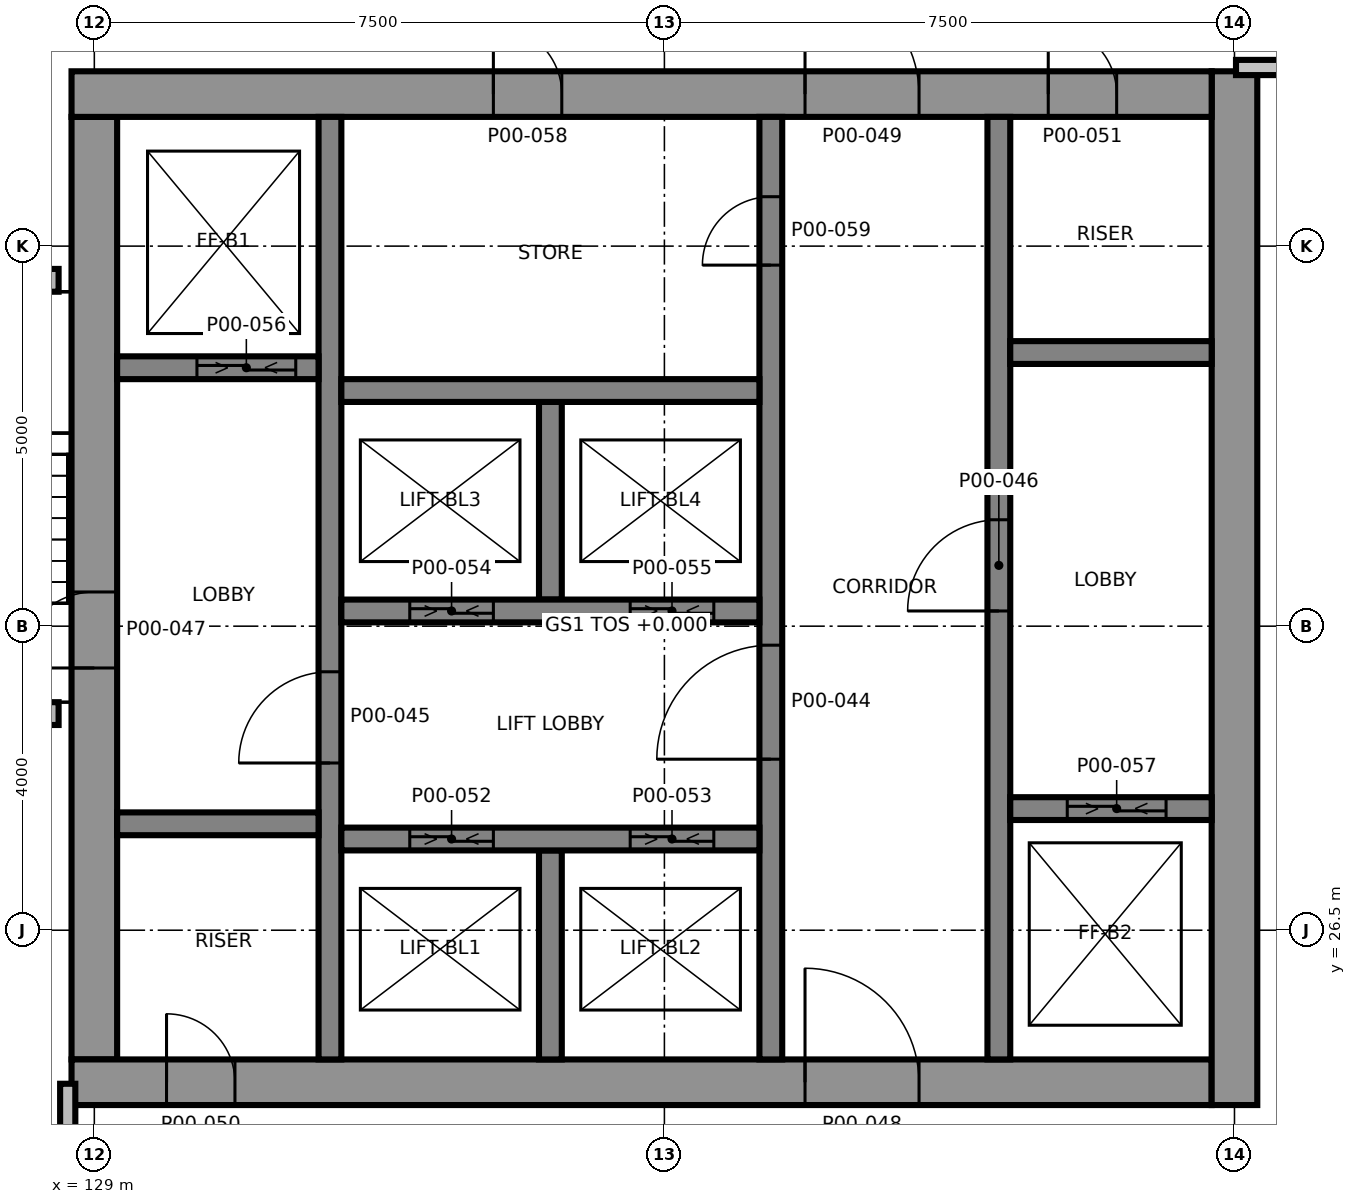
"""IFC4 building model, lengths in metres.
Left out: names, types, materials, properties, quantities, classifications, styles, units other than length and angle.
Written with IfcOpenShell. Run it as: python <this file> out.ifc"""

import sys

from ifc_helpers import new_model, si_unit, direction, frame, frame_2d, origin, place, context, subcontext, project, spatial, rectangle, extrude, element, fill, save


model = new_model("IFC4")
c1 = context("Model", 3, precision=1e-05, world=origin(), true_north=direction((0.0, 1.0)))
c2 = subcontext(c1, "Body", "Model", "MODEL_VIEW")
j1 = project(units=[si_unit("LENGTHUNIT", "METRE"), si_unit("PLANEANGLEUNIT", "RADIAN")], contexts=[c1])
p1 = place(None, origin())
s1 = spatial("IfcSite", under=j1, at=p1, CompositionType="ELEMENT")
p2 = place(p1, origin())
s2 = spatial("IfcBuilding", under=s1, at=p2, CompositionType="ELEMENT")
p3 = place(p2, origin())
s3 = spatial("IfcBuildingStorey", under=s2, at=p3, CompositionType="ELEMENT", Elevation=0.0)
p4 = place(p3, frame((129.0, 24.8, 0.0), z_axis=(0.0, 0.0, 1.0), x_axis=(0.0, 1.0, 0.0)))
e1 = element("IfcWall", 1, at=p4, inside=s3, PredefinedType="SHEAR", context=c2, shape_type="SweptSolid", body=[
    extrude(rectangle(XDim=12.4, YDim=0.6, at=frame_2d((6.2, 0.0))), origin(), (0.0, 0.0, 1.0), 8.0),
])
p5 = place(p4, frame((5.15, 0.0, 0.0)))
e2 = element("IfcOpeningElement", 2, at=p5, cuts=e1, PredefinedType="OPENING", context=c2, shape_type="SweptSolid", body=[
    extrude(rectangle(XDim=1.0, YDim=2.1, at=frame_2d((0.5, 1.05))), frame((0.0, 0.31, 0.0), z_axis=(0.0, -1.0, 0.0), x_axis=(1.0, 0.0, 0.0)), (0.0, 0.0, 1.0), 0.62),
])
p6 = place(p3, frame((128.7, 24.5, 0.0), z_axis=(0.0, 0.0, 1.0), x_axis=(1.0, 0.0, 0.0)))
e3 = element("IfcWall", 3, at=p6, inside=s3, PredefinedType="SHEAR", context=c2, shape_type="SweptSolid", body=[
    extrude(rectangle(XDim=15.0, YDim=0.6, at=frame_2d((7.5, 0.0))), origin(), (0.0, 0.0, 1.0), 8.0),
])
p7 = place(p6, frame((9.65, 0.0, 0.0)))
e4 = element("IfcOpeningElement", 4, at=p7, cuts=e3, PredefinedType="OPENING", context=c2, shape_type="SweptSolid", body=[
    extrude(rectangle(XDim=1.5, YDim=2.1, at=frame_2d((0.75, 1.05))), frame((0.0, 0.31, 0.0), z_axis=(0.0, -1.0, 0.0), x_axis=(1.0, 0.0, 0.0)), (0.0, 0.0, 1.0), 0.62),
])
p8 = place(p6, frame((1.25, 0.0, 0.0)))
e5 = element("IfcOpeningElement", 5, at=p8, cuts=e3, PredefinedType="OPENING", context=c2, shape_type="SweptSolid", body=[
    extrude(rectangle(XDim=0.9, YDim=2.1, at=frame_2d((0.45, 1.05))), frame((0.0, 0.31, 0.0), z_axis=(0.0, -1.0, 0.0), x_axis=(1.0, 0.0, 0.0)), (0.0, 0.0, 1.0), 0.62),
])
p9 = place(p3, frame((144.0, 24.2, 0.0), z_axis=(0.0, 0.0, 1.0), x_axis=(0.0, 1.0, 0.0)))
e6 = element("IfcWall", 6, at=p9, inside=s3, PredefinedType="SHEAR", context=c2, shape_type="SweptSolid", body=[
    extrude(rectangle(XDim=13.6, YDim=0.6, at=frame_2d((6.8, 0.0))), origin(), (0.0, 0.0, 1.0), 8.0),
])
p10 = place(p3, frame((128.7, 37.5, 0.0), z_axis=(0.0, 0.0, 1.0), x_axis=(1.0, 0.0, 0.0)))
e7 = element("IfcWall", 7, at=p10, inside=s3, PredefinedType="SHEAR", context=c2, shape_type="SweptSolid", body=[
    extrude(rectangle(XDim=15.0, YDim=0.6, at=frame_2d((7.5, 0.0))), origin(), (0.0, 0.0, 1.0), 8.0),
])
p11 = place(p10, frame((9.65, 0.0, 0.0)))
e8 = element("IfcOpeningElement", 8, at=p11, cuts=e7, PredefinedType="OPENING", context=c2, shape_type="SweptSolid", body=[
    extrude(rectangle(XDim=1.5, YDim=2.1, at=frame_2d((0.75, 1.05))), frame((0.0, 0.31, 0.0), z_axis=(0.0, -1.0, 0.0), x_axis=(1.0, 0.0, 0.0)), (0.0, 0.0, 1.0), 0.62),
])
p12 = place(p10, frame((12.85, 0.0, 0.0)))
e9 = element("IfcOpeningElement", 9, at=p12, cuts=e7, PredefinedType="OPENING", context=c2, shape_type="SweptSolid", body=[
    extrude(rectangle(XDim=0.9, YDim=2.1, at=frame_2d((0.45, 1.05))), frame((0.0, 0.31, 0.0), z_axis=(0.0, -1.0, 0.0), x_axis=(1.0, 0.0, 0.0)), (0.0, 0.0, 1.0), 0.62),
])
p13 = place(p10, frame((5.55, 0.0, 0.0)))
e10 = element("IfcOpeningElement", 10, at=p13, cuts=e7, PredefinedType="OPENING", context=c2, shape_type="SweptSolid", body=[
    extrude(rectangle(XDim=0.9, YDim=2.1, at=frame_2d((0.45, 1.05))), frame((0.0, 0.31, 0.0), z_axis=(0.0, -1.0, 0.0), x_axis=(1.0, 0.0, 0.0)), (0.0, 0.0, 1.0), 0.62),
])
p14 = place(p3, frame((132.1, 24.8, 0.0), z_axis=(0.0, 0.0, 1.0), x_axis=(0.0, 1.0, 0.0)))
e11 = element("IfcWall", 11, at=p14, inside=s3, PredefinedType="SHEAR", context=c2, shape_type="SweptSolid", body=[
    extrude(rectangle(XDim=12.4, YDim=0.3, at=frame_2d((6.2, 0.0))), origin(), (0.0, 0.0, 1.0), 8.0),
])
p15 = place(p14, frame((3.9, 0.0, 0.0)))
e12 = element("IfcOpeningElement", 12, at=p15, cuts=e11, PredefinedType="OPENING", context=c2, shape_type="SweptSolid", body=[
    extrude(rectangle(XDim=1.2, YDim=2.1, at=frame_2d((0.6, 1.05))), frame((0.0, 0.16, 0.0), z_axis=(0.0, -1.0, 0.0), x_axis=(1.0, 0.0, 0.0)), (0.0, 0.0, 1.0), 0.32),
])
p16 = place(p3, frame((137.9, 24.8, 0.0), z_axis=(0.0, 0.0, 1.0), x_axis=(0.0, 1.0, 0.0)))
e13 = element("IfcWall", 13, at=p16, inside=s3, PredefinedType="SHEAR", context=c2, shape_type="SweptSolid", body=[
    extrude(rectangle(XDim=12.4, YDim=0.3, at=frame_2d((6.2, 0.0))), origin(), (0.0, 0.0, 1.0), 8.0),
])
p17 = place(p16, frame((3.95, 0.0, 0.0)))
e14 = element("IfcOpeningElement", 14, at=p17, cuts=e13, PredefinedType="OPENING", context=c2, shape_type="SweptSolid", body=[
    extrude(rectangle(XDim=1.5, YDim=2.1, at=frame_2d((0.75, 1.05))), frame((0.0, 0.16, 0.0), z_axis=(0.0, -1.0, 0.0), x_axis=(1.0, 0.0, 0.0)), (0.0, 0.0, 1.0), 0.32),
])
p18 = place(p16, frame((10.45, 0.0, 0.0)))
e15 = element("IfcOpeningElement", 15, at=p18, cuts=e13, PredefinedType="OPENING", context=c2, shape_type="SweptSolid", body=[
    extrude(rectangle(XDim=0.9, YDim=2.1, at=frame_2d((0.45, 1.05))), frame((0.0, 0.16, 0.0), z_axis=(0.0, -1.0, 0.0), x_axis=(1.0, 0.0, 0.0)), (0.0, 0.0, 1.0), 0.32),
])
p19 = place(p3, frame((140.9, 24.8, 0.0), z_axis=(0.0, 0.0, 1.0), x_axis=(0.0, 1.0, 0.0)))
e16 = element("IfcWall", 16, at=p19, inside=s3, PredefinedType="SHEAR", context=c2, shape_type="SweptSolid", body=[
    extrude(rectangle(XDim=12.4, YDim=0.3, at=frame_2d((6.2, 0.0))), origin(), (0.0, 0.0, 1.0), 8.0),
])
p20 = place(p19, frame((5.9, 0.0, 0.0)))
e17 = element("IfcOpeningElement", 17, at=p20, cuts=e16, PredefinedType="OPENING", context=c2, shape_type="SweptSolid", body=[
    extrude(rectangle(XDim=1.2, YDim=2.1, at=frame_2d((0.6, 1.05))), frame((0.0, 0.16, 0.0), z_axis=(0.0, -1.0, 0.0), x_axis=(1.0, 0.0, 0.0)), (0.0, 0.0, 1.0), 0.32),
])
p21 = place(p3, frame((135.0, 24.8, 0.0), z_axis=(0.0, 0.0, 1.0), x_axis=(0.0, 1.0, 0.0)))
e18 = element("IfcWall", 18, at=p21, inside=s3, PredefinedType="SHEAR", context=c2, shape_type="SweptSolid", body=[
    extrude(rectangle(XDim=2.75, YDim=0.3, at=frame_2d((1.375, 0.0))), origin(), (0.0, 0.0, 1.0), 8.0),
])
p22 = place(p3, frame((135.0, 30.85, 0.0), z_axis=(0.0, 0.0, 1.0), x_axis=(0.0, 1.0, 0.0)))
e19 = element("IfcWall", 19, at=p22, inside=s3, PredefinedType="SHEAR", context=c2, shape_type="SweptSolid", body=[
    extrude(rectangle(XDim=2.6, YDim=0.3, at=frame_2d((1.3, 0.0))), origin(), (0.0, 0.0, 1.0), 8.0),
])
p23 = place(p3, frame((132.25, 27.7, 0.0), z_axis=(0.0, 0.0, 1.0), x_axis=(1.0, 0.0, 0.0)))
e20 = element("IfcWall", 20, at=p23, inside=s3, PredefinedType="SHEAR", context=c2, shape_type="SweptSolid", body=[
    extrude(rectangle(XDim=5.5, YDim=0.3, at=frame_2d((2.75, 0.0))), origin(), (0.0, 0.0, 1.0), 8.0),
])
p24 = place(p23, frame((0.9, 0.0, 0.0)))
e21 = element("IfcOpeningElement", 21, at=p24, cuts=e20, PredefinedType="OPENING", context=c2, shape_type="SweptSolid", body=[
    extrude(rectangle(XDim=1.1, YDim=2.4, at=frame_2d((0.55, 1.2))), frame((0.0, 0.16, 0.0), z_axis=(0.0, -1.0, 0.0), x_axis=(1.0, 0.0, 0.0)), (0.0, 0.0, 1.0), 0.32),
])
p25 = place(p23, frame((3.8, 0.0, 0.0)))
e22 = element("IfcOpeningElement", 22, at=p25, cuts=e20, PredefinedType="OPENING", context=c2, shape_type="SweptSolid", body=[
    extrude(rectangle(XDim=1.1, YDim=2.4, at=frame_2d((0.55, 1.2))), frame((0.0, 0.16, 0.0), z_axis=(0.0, -1.0, 0.0), x_axis=(1.0, 0.0, 0.0)), (0.0, 0.0, 1.0), 0.32),
])
p26 = place(p3, frame((132.25, 30.7, 0.0), z_axis=(0.0, 0.0, 1.0), x_axis=(1.0, 0.0, 0.0)))
e23 = element("IfcWall", 23, at=p26, inside=s3, PredefinedType="SHEAR", context=c2, shape_type="SweptSolid", body=[
    extrude(rectangle(XDim=5.5, YDim=0.3, at=frame_2d((2.75, 0.0))), origin(), (0.0, 0.0, 1.0), 8.0),
])
p27 = place(p26, frame((0.9, 0.0, 0.0)))
e24 = element("IfcOpeningElement", 24, at=p27, cuts=e23, PredefinedType="OPENING", context=c2, shape_type="SweptSolid", body=[
    extrude(rectangle(XDim=1.1, YDim=2.4, at=frame_2d((0.55, 1.2))), frame((0.0, 0.16, 0.0), z_axis=(0.0, -1.0, 0.0), x_axis=(1.0, 0.0, 0.0)), (0.0, 0.0, 1.0), 0.32),
])
p28 = place(p26, frame((3.8, 0.0, 0.0)))
e25 = element("IfcOpeningElement", 25, at=p28, cuts=e23, PredefinedType="OPENING", context=c2, shape_type="SweptSolid", body=[
    extrude(rectangle(XDim=1.1, YDim=2.4, at=frame_2d((0.55, 1.2))), frame((0.0, 0.16, 0.0), z_axis=(0.0, -1.0, 0.0), x_axis=(1.0, 0.0, 0.0)), (0.0, 0.0, 1.0), 0.32),
])
p29 = place(p3, frame((132.25, 33.6, 0.0), z_axis=(0.0, 0.0, 1.0), x_axis=(1.0, 0.0, 0.0)))
e26 = element("IfcWall", 26, at=p29, inside=s3, PredefinedType="SHEAR", context=c2, shape_type="SweptSolid", body=[
    extrude(rectangle(XDim=5.5, YDim=0.3, at=frame_2d((2.75, 0.0))), origin(), (0.0, 0.0, 1.0), 8.0),
])
p30 = place(p3, frame((129.3, 27.9, 0.0), z_axis=(0.0, 0.0, 1.0), x_axis=(1.0, 0.0, 0.0)))
e27 = element("IfcWall", 27, at=p30, inside=s3, PredefinedType="SHEAR", context=c2, shape_type="SweptSolid", body=[
    extrude(rectangle(XDim=2.65, YDim=0.3, at=frame_2d((1.325, 0.0))), origin(), (0.0, 0.0, 1.0), 8.0),
])
p31 = place(p3, frame((129.3, 33.9, 0.0), z_axis=(0.0, 0.0, 1.0), x_axis=(1.0, 0.0, 0.0)))
e28 = element("IfcWall", 28, at=p31, inside=s3, PredefinedType="SHEAR", context=c2, shape_type="SweptSolid", body=[
    extrude(rectangle(XDim=2.65, YDim=0.3, at=frame_2d((1.325, 0.0))), origin(), (0.0, 0.0, 1.0), 8.0),
])
p32 = place(p31, frame((1.05, 0.0, 0.0)))
e29 = element("IfcOpeningElement", 29, at=p32, cuts=e28, PredefinedType="OPENING", context=c2, shape_type="SweptSolid", body=[
    extrude(rectangle(XDim=1.3, YDim=2.4, at=frame_2d((0.65, 1.2))), frame((0.0, 0.16, 0.0), z_axis=(0.0, -1.0, 0.0), x_axis=(1.0, 0.0, 0.0)), (0.0, 0.0, 1.0), 0.32),
])
p33 = place(p3, frame((141.05, 28.1, 0.0), z_axis=(0.0, 0.0, 1.0), x_axis=(1.0, 0.0, 0.0)))
e30 = element("IfcWall", 30, at=p33, inside=s3, PredefinedType="SHEAR", context=c2, shape_type="SweptSolid", body=[
    extrude(rectangle(XDim=2.65, YDim=0.3, at=frame_2d((1.325, 0.0))), origin(), (0.0, 0.0, 1.0), 8.0),
])
p34 = place(p33, frame((0.75, 0.0, 0.0)))
e31 = element("IfcOpeningElement", 31, at=p34, cuts=e30, PredefinedType="OPENING", context=c2, shape_type="SweptSolid", body=[
    extrude(rectangle(XDim=1.3, YDim=2.4, at=frame_2d((0.65, 1.2))), frame((0.0, 0.16, 0.0), z_axis=(0.0, -1.0, 0.0), x_axis=(1.0, 0.0, 0.0)), (0.0, 0.0, 1.0), 0.32),
])
p35 = place(p3, frame((141.05, 34.1, 0.0), z_axis=(0.0, 0.0, 1.0), x_axis=(1.0, 0.0, 0.0)))
e32 = element("IfcWall", 32, at=p35, inside=s3, PredefinedType="SHEAR", context=c2, shape_type="SweptSolid", body=[
    extrude(rectangle(XDim=2.65, YDim=0.3, at=frame_2d((1.325, 0.0))), origin(), (0.0, 0.0, 1.0), 8.0),
])
p36 = place(p3, frame((125.7, 29.35, 0.0), z_axis=(0.0, 0.0, 1.0), x_axis=(1.0, 0.0, 0.0)))
e33 = element("IfcWall", 33, at=p36, inside=s3, PredefinedType="SHEAR", context=c2, shape_type="SweptSolid", body=[
    extrude(rectangle(XDim=2.83, YDim=0.3, at=frame_2d((1.415, 0.0))), origin(), (0.0, 0.0, 1.0), 7.7),
])
p37 = place(p36, frame((0.975, 0.0, 0.0)))
e34 = element("IfcOpeningElement", 34, at=p37, cuts=e33, PredefinedType="OPENING", context=c2, shape_type="SweptSolid", body=[
    extrude(rectangle(XDim=1.2, YDim=2.1, at=frame_2d((0.6, 1.05))), frame((0.0, 0.16, 0.0), z_axis=(0.0, -1.0, 0.0), x_axis=(1.0, 0.0, 0.0)), (0.0, 0.0, 1.0), 0.32),
])
p38 = place(p3, frame((125.7, 35.05, 0.0), z_axis=(0.0, 0.0, 1.0), x_axis=(1.0, 0.0, 0.0)))
e35 = element("IfcWall", 35, at=p38, inside=s3, PredefinedType="SHEAR", context=c2, shape_type="SweptSolid", body=[
    extrude(rectangle(XDim=2.83, YDim=0.3, at=frame_2d((1.415, 0.0))), origin(), (0.0, 0.0, 1.0), 7.7),
])
p39 = place(p3, frame((144.02, 37.85, 0.0), z_axis=(0.0, 0.0, 1.0), x_axis=(1.0, 0.0, 0.0)))
e36 = element("IfcWall", 36, at=p39, inside=s3, PredefinedType="PARTITIONING", context=c2, shape_type="SweptSolid", body=[
    extrude(rectangle(XDim=3.23, YDim=0.2, at=frame_2d((1.615, 0.0))), origin(), (0.0, 0.0, 1.0), 7.7),
])
p40 = place(p39, frame((1.03, 0.0, 0.0)))
e37 = element("IfcOpeningElement", 37, at=p40, cuts=e36, PredefinedType="OPENING", context=c2, shape_type="SweptSolid", body=[
    extrude(rectangle(XDim=1.5, YDim=2.1, at=frame_2d((0.75, 1.05))), frame((0.0, 0.11, 0.0), z_axis=(0.0, -1.0, 0.0), x_axis=(1.0, 0.0, 0.0)), (0.0, 0.0, 1.0), 0.22),
])
p41 = place(p3, frame((128.65, 11.07, 0.0), z_axis=(0.0, 0.0, 1.0), x_axis=(0.0, 1.0, 0.0)))
e38 = element("IfcWall", 38, at=p41, inside=s3, PredefinedType="PARTITIONING", context=c2, shape_type="SweptSolid", body=[
    extrude(rectangle(XDim=13.41, YDim=0.2, at=frame_2d((6.705, 0.0))), origin(), (0.0, 0.0, 1.0), 6.8),
])
p42 = place(p17, origin())
e39 = element("IfcDoor", 39, at=p42, inside=s3, OperationType="SINGLE_SWING_RIGHT", PredefinedType="DOOR", context=c2, shape_type="SweptSolid", body=[
    extrude(rectangle(XDim=1.5, YDim=2.1, at=frame_2d((0.75, 1.05))), frame((0.0, 0.025, 0.0), z_axis=(0.0, -1.0, 0.0), x_axis=(1.0, 0.0, 0.0)), (0.0, 0.0, 1.0), 0.05),
])
fill(e14, e39)
p43 = place(p15, origin())
e40 = element("IfcDoor", 40, at=p43, inside=s3, OperationType="SINGLE_SWING_LEFT", PredefinedType="DOOR", context=c2, shape_type="SweptSolid", body=[
    extrude(rectangle(XDim=1.2, YDim=2.1, at=frame_2d((0.6, 1.05))), frame((0.0, 0.025, 0.0), z_axis=(0.0, -1.0, 0.0), x_axis=(1.0, 0.0, 0.0)), (0.0, 0.0, 1.0), 0.05),
])
fill(e12, e40)
p44 = place(p20, origin())
e41 = element("IfcDoor", 41, at=p44, inside=s3, OperationType="SINGLE_SWING_RIGHT", PredefinedType="DOOR", context=c2, shape_type="SweptSolid", body=[
    extrude(rectangle(XDim=1.2, YDim=2.1, at=frame_2d((0.6, 1.05))), frame((0.0, 0.025, 0.0), z_axis=(0.0, -1.0, 0.0), x_axis=(1.0, 0.0, 0.0)), (0.0, 0.0, 1.0), 0.05),
])
fill(e17, e41)
p45 = place(p5, origin())
e42 = element("IfcDoor", 42, at=p45, inside=s3, OperationType="SINGLE_SWING_RIGHT", PredefinedType="DOOR", context=c2, shape_type="SweptSolid", body=[
    extrude(rectangle(XDim=1.0, YDim=2.1, at=frame_2d((0.5, 1.05))), frame((0.0, 0.025, 0.0), z_axis=(0.0, -1.0, 0.0), x_axis=(1.0, 0.0, 0.0)), (0.0, 0.0, 1.0), 0.05),
])
fill(e2, e42)
p46 = place(p7, origin())
e43 = element("IfcDoor", 43, at=p46, inside=s3, OperationType="SINGLE_SWING_LEFT", PredefinedType="DOOR", context=c2, shape_type="SweptSolid", body=[
    extrude(rectangle(XDim=1.5, YDim=2.1, at=frame_2d((0.75, 1.05))), frame((0.0, 0.025, 0.0), z_axis=(0.0, -1.0, 0.0), x_axis=(1.0, 0.0, 0.0)), (0.0, 0.0, 1.0), 0.05),
])
fill(e4, e43)
p47 = place(p11, origin())
e44 = element("IfcDoor", 44, at=p47, inside=s3, OperationType="SINGLE_SWING_RIGHT", PredefinedType="DOOR", context=c2, shape_type="SweptSolid", body=[
    extrude(rectangle(XDim=1.5, YDim=2.1, at=frame_2d((0.75, 1.05))), frame((0.0, 0.025, 0.0), z_axis=(0.0, -1.0, 0.0), x_axis=(1.0, 0.0, 0.0)), (0.0, 0.0, 1.0), 0.05),
])
fill(e8, e44)
p48 = place(p8, origin())
e45 = element("IfcDoor", 45, at=p48, inside=s3, OperationType="SINGLE_SWING_LEFT", PredefinedType="DOOR", context=c2, shape_type="SweptSolid", body=[
    extrude(rectangle(XDim=0.9, YDim=2.1, at=frame_2d((0.45, 1.05))), frame((0.0, 0.025, 0.0), z_axis=(0.0, -1.0, 0.0), x_axis=(1.0, 0.0, 0.0)), (0.0, 0.0, 1.0), 0.05),
])
fill(e5, e45)
p49 = place(p12, origin())
e46 = element("IfcDoor", 46, at=p49, inside=s3, OperationType="SINGLE_SWING_RIGHT", PredefinedType="DOOR", context=c2, shape_type="SweptSolid", body=[
    extrude(rectangle(XDim=0.9, YDim=2.1, at=frame_2d((0.45, 1.05))), frame((0.0, 0.025, 0.0), z_axis=(0.0, -1.0, 0.0), x_axis=(1.0, 0.0, 0.0)), (0.0, 0.0, 1.0), 0.05),
])
fill(e9, e46)
p50 = place(p24, origin())
e47 = element("IfcDoor", 47, at=p50, inside=s3, OperationType="SLIDING_TO_LEFT", PredefinedType="DOOR", context=c2, shape_type="SweptSolid", body=[
    extrude(rectangle(XDim=1.1, YDim=2.4, at=frame_2d((0.55, 1.2))), frame((0.0, 0.025, 0.0), z_axis=(0.0, -1.0, 0.0), x_axis=(1.0, 0.0, 0.0)), (0.0, 0.0, 1.0), 0.05),
])
fill(e21, e47)
p51 = place(p25, origin())
e48 = element("IfcDoor", 48, at=p51, inside=s3, OperationType="SLIDING_TO_LEFT", PredefinedType="DOOR", context=c2, shape_type="SweptSolid", body=[
    extrude(rectangle(XDim=1.1, YDim=2.4, at=frame_2d((0.55, 1.2))), frame((0.0, 0.025, 0.0), z_axis=(0.0, -1.0, 0.0), x_axis=(1.0, 0.0, 0.0)), (0.0, 0.0, 1.0), 0.05),
])
fill(e22, e48)
p52 = place(p27, origin())
e49 = element("IfcDoor", 49, at=p52, inside=s3, OperationType="SLIDING_TO_LEFT", PredefinedType="DOOR", context=c2, shape_type="SweptSolid", body=[
    extrude(rectangle(XDim=1.1, YDim=2.4, at=frame_2d((0.55, 1.2))), frame((0.0, 0.025, 0.0), z_axis=(0.0, -1.0, 0.0), x_axis=(1.0, 0.0, 0.0)), (0.0, 0.0, 1.0), 0.05),
])
fill(e24, e49)
p53 = place(p28, origin())
e50 = element("IfcDoor", 50, at=p53, inside=s3, OperationType="SLIDING_TO_LEFT", PredefinedType="DOOR", context=c2, shape_type="SweptSolid", body=[
    extrude(rectangle(XDim=1.1, YDim=2.4, at=frame_2d((0.55, 1.2))), frame((0.0, 0.025, 0.0), z_axis=(0.0, -1.0, 0.0), x_axis=(1.0, 0.0, 0.0)), (0.0, 0.0, 1.0), 0.05),
])
fill(e25, e50)
p54 = place(p32, origin())
e51 = element("IfcDoor", 51, at=p54, inside=s3, OperationType="SLIDING_TO_LEFT", PredefinedType="DOOR", context=c2, shape_type="SweptSolid", body=[
    extrude(rectangle(XDim=1.3, YDim=2.4, at=frame_2d((0.65, 1.2))), frame((0.0, 0.025, 0.0), z_axis=(0.0, -1.0, 0.0), x_axis=(1.0, 0.0, 0.0)), (0.0, 0.0, 1.0), 0.05),
])
fill(e29, e51)
p55 = place(p34, origin())
e52 = element("IfcDoor", 52, at=p55, inside=s3, OperationType="SLIDING_TO_LEFT", PredefinedType="DOOR", context=c2, shape_type="SweptSolid", body=[
    extrude(rectangle(XDim=1.3, YDim=2.4, at=frame_2d((0.65, 1.2))), frame((0.0, 0.025, 0.0), z_axis=(0.0, -1.0, 0.0), x_axis=(1.0, 0.0, 0.0)), (0.0, 0.0, 1.0), 0.05),
])
fill(e31, e52)
p56 = place(p13, origin())
e53 = element("IfcDoor", 53, at=p56, inside=s3, OperationType="SINGLE_SWING_LEFT", PredefinedType="DOOR", context=c2, shape_type="SweptSolid", body=[
    extrude(rectangle(XDim=0.9, YDim=2.1, at=frame_2d((0.45, 1.05))), frame((0.0, 0.025, 0.0), z_axis=(0.0, -1.0, 0.0), x_axis=(1.0, 0.0, 0.0)), (0.0, 0.0, 1.0), 0.05),
])
fill(e10, e53)
p57 = place(p18, origin())
e54 = element("IfcDoor", 54, at=p57, inside=s3, OperationType="SINGLE_SWING_RIGHT", PredefinedType="DOOR", context=c2, shape_type="SweptSolid", body=[
    extrude(rectangle(XDim=0.9, YDim=2.1, at=frame_2d((0.45, 1.05))), frame((0.0, 0.025, 0.0), z_axis=(0.0, -1.0, 0.0), x_axis=(1.0, 0.0, 0.0)), (0.0, 0.0, 1.0), 0.05),
])
fill(e15, e54)
save(model, sys.argv[1])
